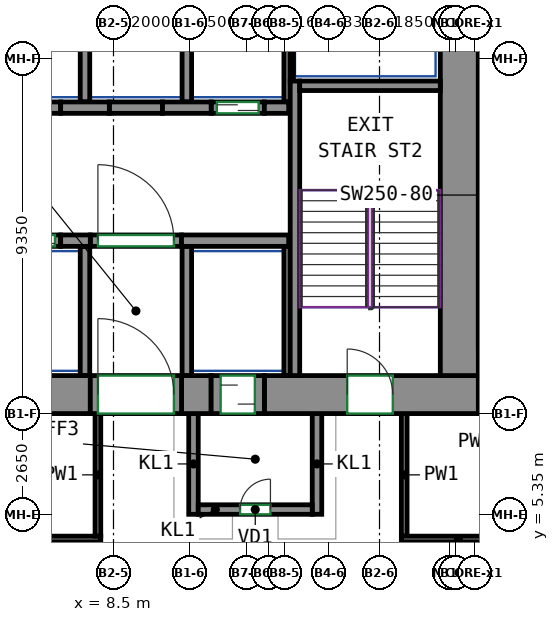
"""IFC4 building model, lengths in metres.
Left out: names, types, materials, properties, quantities, classifications, styles, units other than length and angle.
Written with IfcOpenShell. Run it as: python <this file> out.ifc"""

import sys

from ifc_helpers import new_model, si_unit, direction, frame, frame_2d, origin, place, context, subcontext, project, spatial, rectangle, extrude, source, transform, mapped, element, fill, save


model = new_model("IFC4")
c1 = context("Model", 3, precision=1e-05, world=origin(), true_north=direction((0.0, 1.0)))
c2 = subcontext(c1, "Body", "Model", "MODEL_VIEW")
j1 = project(units=[si_unit("LENGTHUNIT", "METRE"), si_unit("PLANEANGLEUNIT", "RADIAN")], contexts=[c1])
p1 = place(None, origin())
s1 = spatial("IfcSite", under=j1, at=p1, CompositionType="ELEMENT")
p2 = place(p1, origin())
s2 = spatial("IfcBuilding", under=s1, at=p2, CompositionType="ELEMENT")
p3 = place(p2, frame((0.0, 0.0, 79.2)))
s3 = spatial("IfcBuildingStorey", under=s2, at=p3, CompositionType="ELEMENT", Elevation=79.2)
m1 = source(origin(), c2, "Body", "SweptSolid", [
    extrude(rectangle(XDim=14.18, YDim=1.0, at=frame_2d((7.09, 0.0))), origin(), (0.0, 0.0, 1.0), 3.72),
])
p4 = place(p3, frame((-6.29, 8.5, 0.0), z_axis=(0.0, 0.0, 1.0), x_axis=(1.0, 0.0, 0.0)))
e1 = element("IfcWall", 1, at=p4, inside=s3, PredefinedType="SHEAR", context=c2, shape_type="MappedRepresentation", body=[
    mapped(m1, transform((0.0, 0.0, 0.0))),
])
m2 = source(origin(), c2, "Body", "SweptSolid", [
    extrude(rectangle(XDim=0.78, YDim=1.0, at=frame_2d((0.39, 0.0))), origin(), (0.0, 0.0, 1.0), 3.72),
])
p5 = place(p3, frame((10.29, 8.5, 0.0), z_axis=(0.0, 0.0, 1.0), x_axis=(1.0, 0.0, 0.0)))
e2 = element("IfcWall", 2, at=p5, inside=s3, PredefinedType="SHEAR", context=c2, shape_type="MappedRepresentation", body=[
    mapped(m2, transform((0.0, 0.0, 0.0))),
])
m3 = source(origin(), c2, "Body", "SweptSolid", [
    extrude(rectangle(XDim=5.63, YDim=1.0, at=frame_2d((2.815, 0.0))), origin(), (0.0, 0.0, 1.0), 3.72),
])
p6 = place(p3, frame((12.47, 8.5, 0.0), z_axis=(0.0, 0.0, 1.0), x_axis=(1.0, 0.0, 0.0)))
e3 = element("IfcWall", 3, at=p6, inside=s3, PredefinedType="SHEAR", context=c2, shape_type="MappedRepresentation", body=[
    mapped(m3, transform((0.0, 0.0, 0.0))),
])
p7 = place(p6, frame((2.18, 0.0, 0.0)))
e4 = element("IfcOpeningElement", 4, at=p7, cuts=e3, PredefinedType="OPENING", context=c2, shape_type="SweptSolid", body=[
    extrude(rectangle(XDim=1.2, YDim=2.1, at=frame_2d((0.6, 1.05))), frame((0.0, 0.51, 0.0), z_axis=(0.0, -1.0, 0.0), x_axis=(1.0, 0.0, 0.0)), (0.0, 0.0, 1.0), 1.02),
])
m4 = source(origin(), c2, "Body", "SweptSolid", [
    extrude(rectangle(XDim=12.0, YDim=1.0, at=frame_2d((6.0, 0.0))), origin(), (0.0, 0.0, 1.0), 3.72),
])
p8 = place(p3, frame((17.6, 9.0, 0.0), z_axis=(0.0, 0.0, 1.0), x_axis=(0.0, 1.0, 0.0)))
e5 = element("IfcWall", 5, at=p8, inside=s3, PredefinedType="SHEAR", context=c2, shape_type="MappedRepresentation", body=[
    mapped(m4, transform((0.0, 0.0, 0.0))),
])
m5 = source(origin(), c2, "Body", "SweptSolid", [
    extrude(rectangle(XDim=7.75, YDim=0.25, at=frame_2d((3.875, 0.0))), origin(), (0.0, 0.0, 1.0), 3.72),
])
p9 = place(p3, frame((13.275, 9.0, 0.0), z_axis=(0.0, 0.0, 1.0), x_axis=(0.0, 1.0, 0.0)))
e6 = element("IfcWall", 6, at=p9, inside=s3, PredefinedType="SHEAR", context=c2, shape_type="MappedRepresentation", body=[
    mapped(m5, transform((0.0, 0.0, 0.0))),
])
m6 = source(origin(), c2, "Body", "SweptSolid", [
    extrude(rectangle(XDim=3.7, YDim=0.25, at=frame_2d((1.85, 0.0))), origin(), (0.0, 0.0, 1.0), 3.72),
])
p10 = place(p3, frame((13.4, 16.625, 0.0), z_axis=(0.0, 0.0, 1.0), x_axis=(1.0, 0.0, 0.0)))
e7 = element("IfcWall", 7, at=p10, inside=s3, PredefinedType="SHEAR", context=c2, shape_type="MappedRepresentation", body=[
    mapped(m6, transform((0.0, 0.0, 0.0))),
])
m7 = source(origin(), c2, "Body", "SweptSolid", [
    extrude(rectangle(XDim=0.78, YDim=0.3, at=frame_2d((0.39, 0.0))), origin(), (0.0, 0.0, 1.0), 3.72),
])
p11 = place(p3, frame((7.11, 12.55, 0.0), z_axis=(0.0, 0.0, 1.0), x_axis=(1.0, 0.0, 0.0)))
e8 = element("IfcWall", 8, at=p11, inside=s3, PredefinedType="SHEAR", context=c2, shape_type="MappedRepresentation", body=[
    mapped(m7, transform((0.0, 0.0, 0.0))),
])
m8 = source(origin(), c2, "Body", "SweptSolid", [
    extrude(rectangle(XDim=2.82, YDim=0.3, at=frame_2d((1.41, 0.0))), origin(), (0.0, 0.0, 1.0), 3.72),
])
p12 = place(p3, frame((10.29, 12.55, 0.0), z_axis=(0.0, 0.0, 1.0), x_axis=(1.0, 0.0, 0.0)))
e9 = element("IfcWall", 9, at=p12, inside=s3, PredefinedType="SHEAR", context=c2, shape_type="MappedRepresentation", body=[
    mapped(m8, transform((0.0, 0.0, 0.0))),
])
m9 = source(origin(), c2, "Body", "SweptSolid", [
    extrude(rectangle(XDim=1.28, YDim=0.3, at=frame_2d((0.64, 0.0))), origin(), (0.0, 0.0, 1.0), 3.72),
])
p13 = place(p3, frame((7.11, 16.05, 0.0), z_axis=(0.0, 0.0, 1.0), x_axis=(1.0, 0.0, 0.0)))
e10 = element("IfcWall", 10, at=p13, inside=s3, PredefinedType="SHEAR", context=c2, shape_type="MappedRepresentation", body=[
    mapped(m9, transform((0.0, 0.0, 0.0))),
])
m10 = source(origin(), c2, "Body", "SweptSolid", [
    extrude(rectangle(XDim=1.28, YDim=0.3, at=frame_2d((0.64, 0.0))), origin(), (0.0, 0.0, 1.0), 3.72),
])
p14 = place(p3, frame((9.79, 16.05, 0.0), z_axis=(0.0, 0.0, 1.0), x_axis=(1.0, 0.0, 0.0)))
e11 = element("IfcWall", 11, at=p14, inside=s3, PredefinedType="SHEAR", context=c2, shape_type="MappedRepresentation", body=[
    mapped(m10, transform((0.0, 0.0, 0.0))),
])
m11 = source(origin(), c2, "Body", "SweptSolid", [
    extrude(rectangle(XDim=0.64, YDim=0.3, at=frame_2d((0.32, 0.0))), origin(), (0.0, 0.0, 1.0), 3.72),
])
p15 = place(p3, frame((12.47, 16.05, 0.0), z_axis=(0.0, 0.0, 1.0), x_axis=(1.0, 0.0, 0.0)))
e12 = element("IfcWall", 12, at=p15, inside=s3, PredefinedType="SHEAR", context=c2, shape_type="MappedRepresentation", body=[
    mapped(m11, transform((0.0, 0.0, 0.0))),
])
m12 = source(origin(), c2, "Body", "SweptSolid", [
    extrude(rectangle(XDim=1.4, YDim=0.3, at=frame_2d((0.7, 0.0))), origin(), (0.0, 0.0, 1.0), 3.72),
])
p16 = place(p3, frame((5.71, 12.55, 0.0), z_axis=(0.0, 0.0, 1.0), x_axis=(1.0, 0.0, 0.0)))
e13 = element("IfcWall", 13, at=p16, inside=s3, PredefinedType="PARTITIONING", context=c2, shape_type="MappedRepresentation", body=[
    mapped(m12, transform((0.0, 0.0, 0.0))),
])
p17 = place(p16, frame((0.15, 0.0, 0.0)))
e14 = element("IfcOpeningElement", 14, at=p17, cuts=e13, PredefinedType="OPENING", context=c2, shape_type="SweptSolid", body=[
    extrude(rectangle(XDim=1.1, YDim=2.1, at=frame_2d((0.55, 1.05))), frame((0.0, 0.16, 0.0), z_axis=(0.0, -1.0, 0.0), x_axis=(1.0, 0.0, 0.0)), (0.0, 0.0, 1.0), 0.32),
])
m13 = source(origin(), c2, "Body", "SweptSolid", [
    extrude(rectangle(XDim=1.4, YDim=0.3, at=frame_2d((0.7, 0.0))), origin(), (0.0, 0.0, 1.0), 3.72),
])
p18 = place(p3, frame((11.07, 16.05, 0.0), z_axis=(0.0, 0.0, 1.0), x_axis=(1.0, 0.0, 0.0)))
e15 = element("IfcWall", 15, at=p18, inside=s3, PredefinedType="PARTITIONING", context=c2, shape_type="MappedRepresentation", body=[
    mapped(m13, transform((0.0, 0.0, 0.0))),
])
p19 = place(p18, frame((0.15, 0.0, 0.0)))
e16 = element("IfcOpeningElement", 16, at=p19, cuts=e15, PredefinedType="OPENING", context=c2, shape_type="SweptSolid", body=[
    extrude(rectangle(XDim=1.1, YDim=2.1, at=frame_2d((0.55, 1.05))), frame((0.0, 0.16, 0.0), z_axis=(0.0, -1.0, 0.0), x_axis=(1.0, 0.0, 0.0)), (0.0, 0.0, 1.0), 0.32),
])
m14 = source(origin(), c2, "Body", "SweptSolid", [
    extrude(rectangle(XDim=2.4, YDim=0.3, at=frame_2d((1.2, 0.0))), origin(), (0.0, 0.0, 1.0), 3.72),
])
p20 = place(p3, frame((7.89, 12.55, 0.0), z_axis=(0.0, 0.0, 1.0), x_axis=(1.0, 0.0, 0.0)))
e17 = element("IfcWall", 17, at=p20, inside=s3, PredefinedType="PARTITIONING", context=c2, shape_type="MappedRepresentation", body=[
    mapped(m14, transform((0.0, 0.0, 0.0))),
])
p21 = place(p20, frame((0.2, 0.0, 0.0)))
e18 = element("IfcOpeningElement", 18, at=p21, cuts=e17, PredefinedType="OPENING", context=c2, shape_type="SweptSolid", body=[
    extrude(rectangle(XDim=2.0, YDim=2.1, at=frame_2d((1.0, 1.05))), frame((0.0, 0.16, 0.0), z_axis=(0.0, -1.0, 0.0), x_axis=(1.0, 0.0, 0.0)), (0.0, 0.0, 1.0), 0.32),
])
for number, where, z_axis, x_axis in (
    (19, (5.71, 16.05, 0.0), (0.0, 0.0, 1.0), (1.0, 0.0, 0.0)),
    (20, (8.39, 16.05, 0.0), (0.0, 0.0, 1.0), (1.0, 0.0, 0.0)),
):
    element("IfcWall", number, at=place(p3, frame(where, z_axis=z_axis, x_axis=x_axis)), inside=s3, PredefinedType="PARTITIONING", context=c2, shape_type="MappedRepresentation", body=[
        mapped(m12, transform((0.0, 0.0, 0.0))),
    ])
m15 = source(origin(), c2, "Body", "SweptSolid", [
    extrude(rectangle(XDim=2.65, YDim=0.25, at=frame_2d((1.325, 0.0))), origin(), (0.0, 0.0, 1.0), 3.72),
])
for number, where, z_axis, x_axis in (
    (21, (10.605, 5.35, 0.0), (0.0, 0.0, 1.0), (0.0, 1.0, 0.0)),
    (22, (13.855, 5.35, 0.0), (0.0, 0.0, 1.0), (0.0, 1.0, 0.0)),
):
    element("IfcWall", number, at=place(p3, frame(where, z_axis=z_axis, x_axis=x_axis)), inside=s3, PredefinedType="PARTITIONING", context=c2, shape_type="MappedRepresentation", body=[
        mapped(m15, transform((0.0, 0.0, 0.0))),
    ])
m16 = source(origin(), c2, "Body", "SweptSolid", [
    extrude(rectangle(XDim=3.0, YDim=0.25, at=frame_2d((1.5, 0.0))), origin(), (0.0, 0.0, 1.0), 3.72),
])
p22 = place(p3, frame((10.73, 5.475, 0.0), z_axis=(0.0, 0.0, 1.0), x_axis=(1.0, 0.0, 0.0)))
e23 = element("IfcWall", 23, at=p22, inside=s3, PredefinedType="PARTITIONING", context=c2, shape_type="MappedRepresentation", body=[
    mapped(m16, transform((0.0, 0.0, 0.0))),
])
p23 = place(p22, frame((1.1, 0.0, 0.0)))
e24 = element("IfcOpeningElement", 24, at=p23, cuts=e23, PredefinedType="OPENING", context=c2, shape_type="SweptSolid", body=[
    extrude(rectangle(XDim=0.8, YDim=2.0, at=frame_2d((0.4, 1.0))), frame((0.0, 0.135, 0.0), z_axis=(0.0, -1.0, 0.0), x_axis=(1.0, 0.0, 0.0)), (0.0, 0.0, 1.0), 0.27),
])
m17 = source(origin(), c2, "Body", "SweptSolid", [
    extrude(rectangle(XDim=3.275, YDim=0.165, at=frame_2d((1.638, 0.0))), origin(), (0.0, 0.0, 1.0), 3.72),
])
p24 = place(p3, frame((13.067, 16.2, 0.0), z_axis=(0.0, 0.0, 1.0), x_axis=(0.0, 1.0, 0.0)))
e25 = element("IfcWall", 25, at=p24, inside=s3, PredefinedType="PARTITIONING", context=c2, shape_type="MappedRepresentation", body=[
    mapped(m17, transform((0.0, 0.0, 0.0))),
])
m18 = source(origin(), c2, "Body", "SweptSolid", [
    extrude(rectangle(XDim=3.275, YDim=0.25, at=frame_2d((1.638, 0.0))), origin(), (0.0, 0.0, 1.0), 3.72),
])
p25 = place(p3, frame((10.43, 16.2, 0.0), z_axis=(0.0, 0.0, 1.0), x_axis=(0.0, 1.0, 0.0)))
e26 = element("IfcWall", 26, at=p25, inside=s3, PredefinedType="PARTITIONING", context=c2, shape_type="MappedRepresentation", body=[
    mapped(m18, transform((0.0, 0.0, 0.0))),
])
m19 = source(origin(), c2, "Body", "SweptSolid", [
    extrude(rectangle(XDim=2.725, YDim=0.085, at=frame_2d((1.363, 0.0))), origin(), (0.0, 0.0, 1.0), 3.72),
])
p26 = place(p3, frame((13.192, 16.75, 0.0), z_axis=(0.0, 0.0, 1.0), x_axis=(0.0, 1.0, 0.0)))
e27 = element("IfcWall", 27, at=p26, inside=s3, PredefinedType="PARTITIONING", context=c2, shape_type="MappedRepresentation", body=[
    mapped(m19, transform((0.0, 0.0, 0.0))),
])
p27 = place(p3, frame((7.75, 16.2, 0.0), z_axis=(0.0, 0.0, 1.0), x_axis=(0.0, 1.0, 0.0)))
e28 = element("IfcWall", 28, at=p27, inside=s3, PredefinedType="PARTITIONING", context=c2, shape_type="MappedRepresentation", body=[
    mapped(m18, transform((0.0, 0.0, 0.0))),
])
m20 = source(origin(), c2, "Body", "SweptSolid", [
    extrude(rectangle(XDim=3.4, YDim=0.25, at=frame_2d((1.7, 0.0))), origin(), (0.0, 0.0, 1.0), 3.72),
])
p28 = place(p3, frame((10.43, 9.0, 0.0), z_axis=(0.0, 0.0, 1.0), x_axis=(0.0, 1.0, 0.0)))
e29 = element("IfcWall", 29, at=p28, inside=s3, PredefinedType="PARTITIONING", context=c2, shape_type="MappedRepresentation", body=[
    mapped(m20, transform((0.0, 0.0, 0.0))),
])
m21 = source(origin(), c2, "Body", "SweptSolid", [
    extrude(rectangle(XDim=3.4, YDim=0.165, at=frame_2d((1.7, 0.0))), origin(), (0.0, 0.0, 1.0), 3.72),
])
p29 = place(p3, frame((13.067, 9.0, 0.0), z_axis=(0.0, 0.0, 1.0), x_axis=(0.0, 1.0, 0.0)))
e30 = element("IfcWall", 30, at=p29, inside=s3, PredefinedType="PARTITIONING", context=c2, shape_type="MappedRepresentation", body=[
    mapped(m21, transform((0.0, 0.0, 0.0))),
])
p30 = place(p3, frame((7.75, 9.0, 0.0), z_axis=(0.0, 0.0, 1.0), x_axis=(0.0, 1.0, 0.0)))
e31 = element("IfcWall", 31, at=p30, inside=s3, PredefinedType="PARTITIONING", context=c2, shape_type="MappedRepresentation", body=[
    mapped(m20, transform((0.0, 0.0, 0.0))),
])
m22 = source(origin(), c2, "Body", "SweptSolid", [
    extrude(rectangle(XDim=2.4, YDim=1.0, at=frame_2d((1.2, 0.0))), origin(), (0.0, 0.0, 1.0), 2.7),
])
p31 = place(p3, frame((7.89, 8.5, 0.0), z_axis=(0.0, 0.0, 1.0), x_axis=(1.0, 0.0, 0.0)))
e32 = element("IfcWall", 32, at=p31, inside=s3, PredefinedType="PARTITIONING", context=c2, shape_type="MappedRepresentation", body=[
    mapped(m22, transform((0.0, 0.0, 0.0))),
])
p32 = place(p31, frame((0.2, 0.0, 0.0)))
e33 = element("IfcOpeningElement", 33, at=p32, cuts=e32, PredefinedType="OPENING", context=c2, shape_type="SweptSolid", body=[
    extrude(rectangle(XDim=2.0, YDim=2.1, at=frame_2d((1.0, 1.05))), frame((0.0, 0.51, 0.0), z_axis=(0.0, -1.0, 0.0), x_axis=(1.0, 0.0, 0.0)), (0.0, 0.0, 1.0), 1.02),
])
m23 = source(origin(), c2, "Body", "SweptSolid", [
    extrude(rectangle(XDim=1.4, YDim=1.0, at=frame_2d((0.7, 0.0))), origin(), (0.0, 0.0, 1.0), 2.7),
])
p33 = place(p3, frame((11.07, 8.5, 0.0), z_axis=(0.0, 0.0, 1.0), x_axis=(1.0, 0.0, 0.0)))
e34 = element("IfcWall", 34, at=p33, inside=s3, PredefinedType="PARTITIONING", context=c2, shape_type="MappedRepresentation", body=[
    mapped(m23, transform((0.0, 0.0, 0.0))),
])
p34 = place(p33, frame((0.25, 0.0, 0.0)))
e35 = element("IfcOpeningElement", 35, at=p34, cuts=e34, PredefinedType="OPENING", context=c2, shape_type="SweptSolid", body=[
    extrude(rectangle(XDim=0.9, YDim=2.1, at=frame_2d((0.45, 1.05))), frame((0.0, 0.51, 0.0), z_axis=(0.0, -1.0, 0.0), x_axis=(1.0, 0.0, 0.0)), (0.0, 0.0, 1.0), 1.02),
])
p35 = place(p3, frame((-7.805, 4.7, 0.0), z_axis=(0.0, 0.0, 1.0), x_axis=(1.0, 0.0, 0.0)))
e36 = element("IfcWall", 36, at=p35, inside=s3, PredefinedType="PARTITIONING", context=c2, shape_type="SweptSolid", body=[
    extrude(rectangle(XDim=15.97, YDim=0.15, at=frame_2d((7.985, 0.0))), origin(), (0.0, 0.0, 1.0), 3.72),
])
p36 = place(p35, frame((8.439, 0.0, 0.0)))
e37 = element("IfcOpeningElement", 37, at=p36, cuts=e36, PredefinedType="OPENING", context=c2, shape_type="SweptSolid", body=[
    extrude(rectangle(XDim=0.9, YDim=2.1, at=frame_2d((0.45, 1.05))), frame((0.0, 0.085, 0.0), z_axis=(0.0, -1.0, 0.0), x_axis=(1.0, 0.0, 0.0)), (0.0, 0.0, 1.0), 0.17),
])
for number, where, z_axis, x_axis in (
    (38, (8.09, 8.0, 0.0), (0.0, 0.0, 1.0), (0.0, -1.0, 0.0)),
    (39, (16.15, 4.775, 0.0), (0.0, 0.0, 1.0), (0.0, 1.0, 0.0)),
):
    element("IfcWall", number, at=place(p3, frame(where, z_axis=z_axis, x_axis=x_axis)), inside=s3, PredefinedType="PARTITIONING", context=c2, shape_type="SweptSolid", body=[
        extrude(rectangle(XDim=3.225, YDim=0.15, at=frame_2d((1.613, 0.0))), origin(), (0.0, 0.0, 1.0), 3.72),
    ])
p37 = place(p3, frame((16.075, 4.7, 0.0), z_axis=(0.0, 0.0, 1.0), x_axis=(1.0, 0.0, 0.0)))
e40 = element("IfcWall", 40, at=p37, inside=s3, PredefinedType="PARTITIONING", context=c2, shape_type="SweptSolid", body=[
    extrude(rectangle(XDim=3.0, YDim=0.15, at=frame_2d((1.5, 0.0))), origin(), (0.0, 0.0, 1.0), 3.72),
])
p38 = place(p21, origin())
e41 = element("IfcDoor", 41, at=p38, inside=s3, OperationType="DOUBLE_DOOR_SINGLE_SWING", PredefinedType="DOOR", context=c2, shape_type="SweptSolid", body=[
    extrude(rectangle(XDim=2.0, YDim=2.1, at=frame_2d((1.0, 1.05))), frame((0.0, 0.025, 0.0), z_axis=(0.0, -1.0, 0.0), x_axis=(1.0, 0.0, 0.0)), (0.0, 0.0, 1.0), 0.05),
])
fill(e18, e41)
p39 = place(p32, origin())
e42 = element("IfcDoor", 42, at=p39, inside=s3, OperationType="DOUBLE_DOOR_SINGLE_SWING", PredefinedType="DOOR", context=c2, shape_type="SweptSolid", body=[
    extrude(rectangle(XDim=2.0, YDim=2.1, at=frame_2d((1.0, 1.05))), frame((0.0, 0.405, 0.0), z_axis=(0.0, -1.0, 0.0), x_axis=(1.0, 0.0, 0.0)), (0.0, 0.0, 1.0), 0.05),
])
fill(e33, e42)
p40 = place(p23, origin())
e43 = element("IfcDoor", 43, at=p40, inside=s3, OperationType="SINGLE_SWING_RIGHT", PredefinedType="DOOR", context=c2, shape_type="SweptSolid", body=[
    extrude(rectangle(XDim=0.8, YDim=2.0, at=frame_2d((0.4, 1.0))), frame((0.0, 0.025, 0.0), z_axis=(0.0, -1.0, 0.0), x_axis=(1.0, 0.0, 0.0)), (0.0, 0.0, 1.0), 0.05),
])
fill(e24, e43)
p41 = place(p34, origin())
e44 = element("IfcDoor", 44, at=p41, inside=s3, OperationType="SLIDING_TO_LEFT", PredefinedType="DOOR", context=c2, shape_type="SweptSolid", body=[
    extrude(rectangle(XDim=0.9, YDim=2.1, at=frame_2d((0.45, 1.05))), frame((0.0, 0.405, 0.0), z_axis=(0.0, -1.0, 0.0), x_axis=(1.0, 0.0, 0.0)), (0.0, 0.0, 1.0), 0.05),
])
fill(e35, e44)
p42 = place(p17, origin())
e45 = element("IfcDoor", 45, at=p42, inside=s3, OperationType="DOUBLE_DOOR_SLIDING", PredefinedType="DOOR", context=c2, shape_type="SweptSolid", body=[
    extrude(rectangle(XDim=1.1, YDim=2.1, at=frame_2d((0.55, 1.05))), frame((0.0, 0.025, 0.0), z_axis=(0.0, -1.0, 0.0), x_axis=(1.0, 0.0, 0.0)), (0.0, 0.0, 1.0), 0.05),
])
fill(e14, e45)
p43 = place(p19, origin())
e46 = element("IfcDoor", 46, at=p43, inside=s3, OperationType="DOUBLE_DOOR_SLIDING", PredefinedType="DOOR", context=c2, shape_type="SweptSolid", body=[
    extrude(rectangle(XDim=1.1, YDim=2.1, at=frame_2d((0.55, 1.05))), frame((0.0, 0.025, 0.0), z_axis=(0.0, -1.0, 0.0), x_axis=(1.0, 0.0, 0.0)), (0.0, 0.0, 1.0), 0.05),
])
fill(e16, e46)
p44 = place(p7, origin())
e47 = element("IfcDoor", 47, at=p44, inside=s3, OperationType="DOUBLE_DOOR_SINGLE_SWING", PredefinedType="DOOR", context=c2, shape_type="SweptSolid", body=[
    extrude(rectangle(XDim=1.2, YDim=2.1, at=frame_2d((0.6, 1.05))), frame((0.0, 0.405, 0.0), z_axis=(0.0, -1.0, 0.0), x_axis=(1.0, 0.0, 0.0)), (0.0, 0.0, 1.0), 0.05),
])
fill(e4, e47)
save(model, sys.argv[1])
